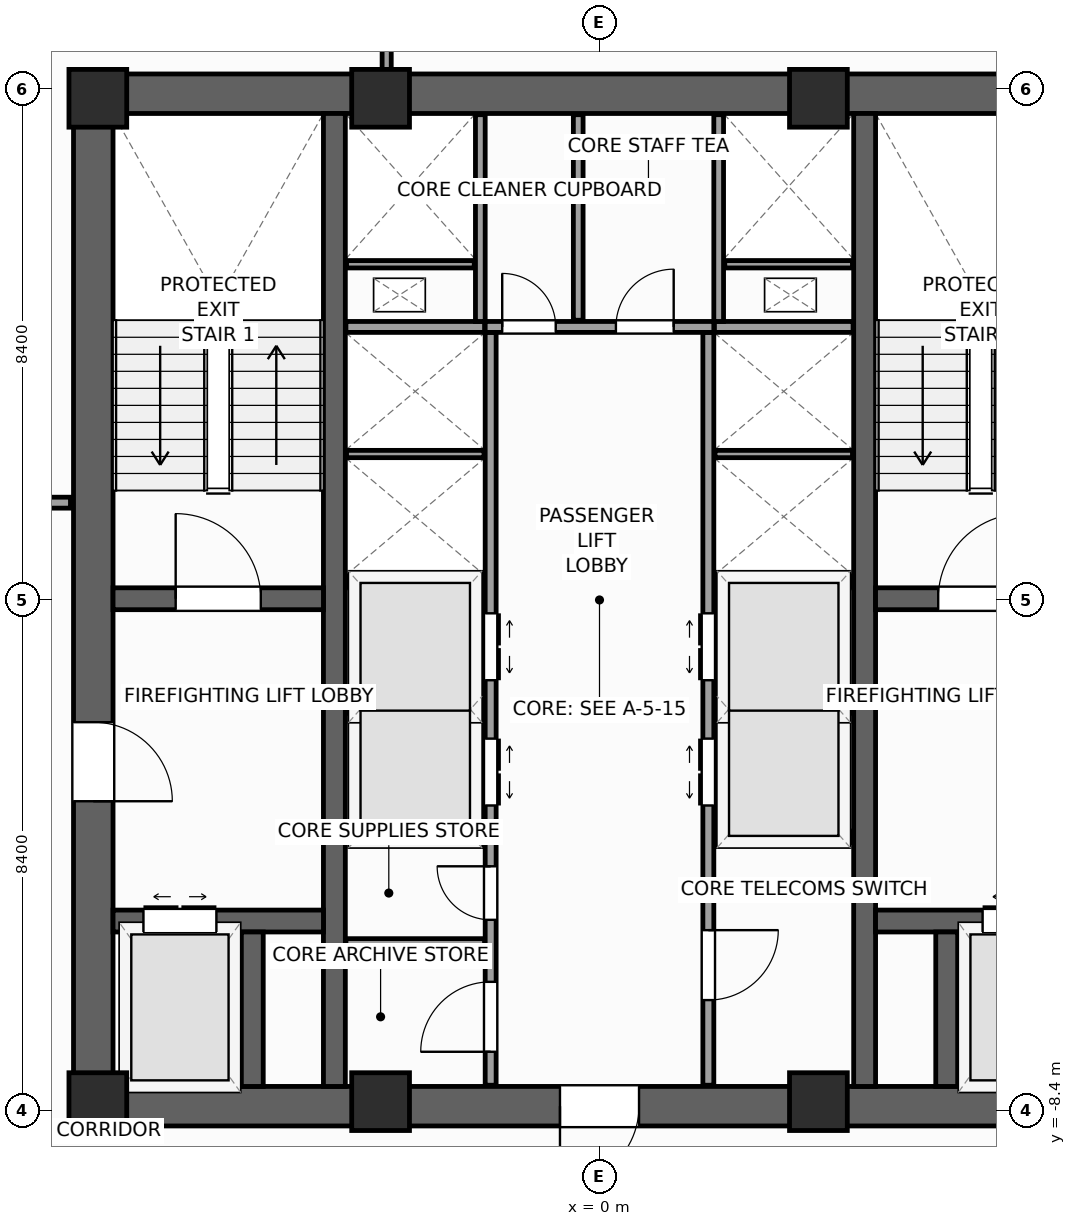
"""IFC4 building model, lengths in metres.
Left out: names, types, materials, properties, quantities, classifications, styles, units other than length and angle.
Written with IfcOpenShell. Run it as: python <this file> out.ifc"""

import sys

from ifc_helpers import new_model, si_unit, direction, frame, frame_2d, origin, origin_2d, place, context, subcontext, project, spatial, rectangle, extrude, source, transform, mapped, element, fill, save


model = new_model("IFC4")
c1 = context("Model", 3, precision=1e-05, world=origin(), true_north=direction((0.0, 1.0)))
c2 = subcontext(c1, "Body", "Model", "MODEL_VIEW")
j1 = project(units=[si_unit("LENGTHUNIT", "METRE"), si_unit("PLANEANGLEUNIT", "RADIAN")], contexts=[c1])
p1 = place(None, origin())
s1 = spatial("IfcSite", under=j1, at=p1, CompositionType="ELEMENT")
p2 = place(p1, origin())
s2 = spatial("IfcBuilding", under=s1, at=p2, CompositionType="ELEMENT")
p3 = place(p2, frame((0.0, 0.0, 156.4)))
s3 = spatial("IfcBuildingStorey", under=s2, at=p3, CompositionType="ELEMENT", Elevation=156.4)
p4 = place(p3, frame((-8.65, -8.325, 0.0), z_axis=(0.0, 0.0, 1.0), x_axis=(1.0, 0.0, 0.0)))
e1 = element("IfcWall", 1, at=p4, inside=s3, PredefinedType="SHEAR", context=c2, shape_type="SweptSolid", body=[
    extrude(rectangle(XDim=17.3, YDim=0.65, at=frame_2d((8.65, 0.0))), origin(), (0.0, 0.0, 1.0), 4.0),
])
p5 = place(p4, frame((8.0, 0.0, 0.0)))
e2 = element("IfcOpeningElement", 2, at=p5, cuts=e1, PredefinedType="OPENING", context=c2, shape_type="SweptSolid", body=[
    extrude(rectangle(XDim=1.3, YDim=2.2, at=frame_2d((0.65, 1.1))), frame((0.0, 0.335, 0.0), z_axis=(0.0, -1.0, 0.0), x_axis=(1.0, 0.0, 0.0)), (0.0, 0.0, 1.0), 0.67),
])
p6 = place(p3, frame((-8.65, 8.325, 0.0), z_axis=(0.0, 0.0, 1.0), x_axis=(1.0, 0.0, 0.0)))
e3 = element("IfcWall", 3, at=p6, inside=s3, PredefinedType="SHEAR", context=c2, shape_type="SweptSolid", body=[
    extrude(rectangle(XDim=17.3, YDim=0.65, at=frame_2d((8.65, 0.0))), origin(), (0.0, 0.0, 1.0), 4.0),
])
p7 = place(p3, frame((-8.325, -8.0, 0.0), z_axis=(0.0, 0.0, 1.0), x_axis=(0.0, 1.0, 0.0)))
e4 = element("IfcWall", 4, at=p7, inside=s3, PredefinedType="SHEAR", context=c2, shape_type="SweptSolid", body=[
    extrude(rectangle(XDim=16.0, YDim=0.65, at=frame_2d((8.0, 0.0))), origin(), (0.0, 0.0, 1.0), 4.0),
])
p8 = place(p7, frame((4.69, 0.0, 0.0)))
e5 = element("IfcOpeningElement", 5, at=p8, cuts=e4, PredefinedType="OPENING", context=c2, shape_type="SweptSolid", body=[
    extrude(rectangle(XDim=1.3, YDim=2.2, at=frame_2d((0.65, 1.1))), frame((0.0, 0.335, 0.0), z_axis=(0.0, -1.0, 0.0), x_axis=(1.0, 0.0, 0.0)), (0.0, 0.0, 1.0), 0.67),
])
for number, where, z_axis, x_axis in (
    (6, (-4.36, -8.0, 0.0), (0.0, 0.0, 1.0), (0.0, 1.0, 0.0)),
    (7, (4.36, -8.0, 0.0), (0.0, 0.0, 1.0), (0.0, 1.0, 0.0)),
):
    element("IfcWall", number, at=place(p3, frame(where, z_axis=z_axis, x_axis=x_axis)), inside=s3, PredefinedType="SHEAR", context=c2, shape_type="SweptSolid", body=[
        extrude(rectangle(XDim=16.0, YDim=0.36, at=frame_2d((8.0, 0.0))), origin(), (0.0, 0.0, 1.0), 4.0),
    ])
p9 = place(p3, frame((-8.0, 0.02, 0.0), z_axis=(0.0, 0.0, 1.0), x_axis=(1.0, 0.0, 0.0)))
e8 = element("IfcWall", 8, at=p9, inside=s3, PredefinedType="SHEAR", context=c2, shape_type="SweptSolid", body=[
    extrude(rectangle(XDim=3.46, YDim=0.36, at=frame_2d((1.73, 0.0))), origin(), (0.0, 0.0, 1.0), 4.0),
])
p10 = place(p9, frame((1.03, 0.0, 0.0)))
e9 = element("IfcOpeningElement", 9, at=p10, cuts=e8, PredefinedType="OPENING", context=c2, shape_type="SweptSolid", body=[
    extrude(rectangle(XDim=1.4, YDim=2.2, at=frame_2d((0.7, 1.1))), frame((0.0, 0.19, 0.0), z_axis=(0.0, -1.0, 0.0), x_axis=(1.0, 0.0, 0.0)), (0.0, 0.0, 1.0), 0.38),
])
p11 = place(p3, frame((4.54, 0.02, 0.0), z_axis=(0.0, 0.0, 1.0), x_axis=(1.0, 0.0, 0.0)))
e10 = element("IfcWall", 10, at=p11, inside=s3, PredefinedType="SHEAR", context=c2, shape_type="SweptSolid", body=[
    extrude(rectangle(XDim=3.46, YDim=0.36, at=frame_2d((1.73, 0.0))), origin(), (0.0, 0.0, 1.0), 4.0),
])
p12 = place(p11, frame((1.03, 0.0, 0.0)))
e11 = element("IfcOpeningElement", 11, at=p12, cuts=e10, PredefinedType="OPENING", context=c2, shape_type="SweptSolid", body=[
    extrude(rectangle(XDim=1.4, YDim=2.2, at=frame_2d((0.7, 1.1))), frame((0.0, 0.19, 0.0), z_axis=(0.0, -1.0, 0.0), x_axis=(1.0, 0.0, 0.0)), (0.0, 0.0, 1.0), 0.38),
])
p13 = place(p3, frame((-8.0, -5.28, 0.0), z_axis=(0.0, 0.0, 1.0), x_axis=(1.0, 0.0, 0.0)))
e12 = element("IfcWall", 12, at=p13, inside=s3, PredefinedType="SHEAR", context=c2, shape_type="SweptSolid", body=[
    extrude(rectangle(XDim=3.46, YDim=0.36, at=frame_2d((1.73, 0.0))), origin(), (0.0, 0.0, 1.0), 4.0),
])
p14 = place(p13, frame((0.5, 0.0, 0.0)))
e13 = element("IfcOpeningElement", 13, at=p14, cuts=e12, PredefinedType="OPENING", context=c2, shape_type="SweptSolid", body=[
    extrude(rectangle(XDim=1.2, YDim=2.25, at=frame_2d((0.6, 1.125))), frame((0.0, 0.19, 0.0), z_axis=(0.0, -1.0, 0.0), x_axis=(1.0, 0.0, 0.0)), (0.0, 0.0, 1.0), 0.38),
])
p15 = place(p3, frame((4.54, -5.28, 0.0), z_axis=(0.0, 0.0, 1.0), x_axis=(1.0, 0.0, 0.0)))
e14 = element("IfcWall", 14, at=p15, inside=s3, PredefinedType="SHEAR", context=c2, shape_type="SweptSolid", body=[
    extrude(rectangle(XDim=3.46, YDim=0.36, at=frame_2d((1.73, 0.0))), origin(), (0.0, 0.0, 1.0), 4.0),
])
p16 = place(p15, frame((1.76, 0.0, 0.0)))
e15 = element("IfcOpeningElement", 15, at=p16, cuts=e14, PredefinedType="OPENING", context=c2, shape_type="SweptSolid", body=[
    extrude(rectangle(XDim=1.2, YDim=2.25, at=frame_2d((0.6, 1.125))), frame((0.0, 0.19, 0.0), z_axis=(0.0, -1.0, 0.0), x_axis=(1.0, 0.0, 0.0)), (0.0, 0.0, 1.0), 0.38),
])
for number, where, z_axis, x_axis in (
    (16, (-5.71, -8.0, 0.0), (0.0, 0.0, 1.0), (0.0, 1.0, 0.0)),
    (17, (5.71, -8.0, 0.0), (0.0, 0.0, 1.0), (0.0, 1.0, 0.0)),
):
    element("IfcWall", number, at=place(p3, frame(where, z_axis=z_axis, x_axis=x_axis)), inside=s3, PredefinedType="SHEAR", context=c2, shape_type="SweptSolid", body=[
        extrude(rectangle(XDim=2.54, YDim=0.36, at=frame_2d((1.27, 0.0))), origin(), (0.0, 0.0, 1.0), 4.0),
    ])
m1 = source(origin(), c2, "Body", "SweptSolid", [
    extrude(rectangle(XDim=0.95, YDim=0.95, at=origin_2d()), origin(), (0.0, 0.0, 1.0), 4.0),
])
for number, where, z_axis, x_axis in (
    (18, (-8.25, -8.25, 0.0), (0.0, 0.0, 1.0), (1.0, 0.0, 0.0)),
    (19, (-8.25, 8.25, 0.0), (0.0, 0.0, 1.0), (1.0, 0.0, 0.0)),
    (20, (-3.6, -8.25, 0.0), (0.0, 0.0, 1.0), (1.0, 0.0, 0.0)),
    (21, (3.6, -8.25, 0.0), (0.0, 0.0, 1.0), (1.0, 0.0, 0.0)),
    (22, (-3.6, 8.25, 0.0), (0.0, 0.0, 1.0), (1.0, 0.0, 0.0)),
    (23, (3.6, 8.25, 0.0), (0.0, 0.0, 1.0), (1.0, 0.0, 0.0)),
):
    element("IfcColumn", number, at=place(p3, frame(where, z_axis=z_axis, x_axis=x_axis)), inside=s3, PredefinedType="PILASTER", context=c2, shape_type="MappedRepresentation", body=[
        mapped(m1, transform((0.0, 0.0, 0.0), scale=1.0)),
    ])
p17 = place(p3, frame((-1.79, -7.98, 0.0), z_axis=(0.0, 0.0, 1.0), x_axis=(0.0, 1.0, 0.0)))
e24 = element("IfcWall", 24, at=p17, inside=s3, PredefinedType="PARTITIONING", context=c2, shape_type="SweptSolid", body=[
    extrude(rectangle(XDim=12.38, YDim=0.18, at=frame_2d((6.19, 0.0))), origin(), (0.0, 0.0, 1.0), 3.74),
])
p18 = place(p17, frame((4.6, 0.0, 0.0)))
e25 = element("IfcOpeningElement", 25, at=p18, cuts=e24, PredefinedType="OPENING", context=c2, shape_type="SweptSolid", body=[
    extrude(rectangle(XDim=1.1, YDim=2.2, at=frame_2d((0.55, 1.1))), frame((0.0, 0.1, 0.0), z_axis=(0.0, -1.0, 0.0), x_axis=(1.0, 0.0, 0.0)), (0.0, 0.0, 1.0), 0.2),
])
p19 = place(p17, frame((6.66, 0.0, 0.0)))
e26 = element("IfcOpeningElement", 26, at=p19, cuts=e24, PredefinedType="OPENING", context=c2, shape_type="SweptSolid", body=[
    extrude(rectangle(XDim=1.1, YDim=2.2, at=frame_2d((0.55, 1.1))), frame((0.0, 0.1, 0.0), z_axis=(0.0, -1.0, 0.0), x_axis=(1.0, 0.0, 0.0)), (0.0, 0.0, 1.0), 0.2),
])
p20 = place(p17, frame((0.55, 0.0, 0.0)))
e27 = element("IfcOpeningElement", 27, at=p20, cuts=e24, PredefinedType="OPENING", context=c2, shape_type="SweptSolid", body=[
    extrude(rectangle(XDim=1.15, YDim=2.25, at=frame_2d((0.575, 1.125))), frame((0.0, 0.1, 0.0), z_axis=(0.0, -1.0, 0.0), x_axis=(1.0, 0.0, 0.0)), (0.0, 0.0, 1.0), 0.2),
])
p21 = place(p17, frame((2.72, 0.0, 0.0)))
e28 = element("IfcOpeningElement", 28, at=p21, cuts=e24, PredefinedType="OPENING", context=c2, shape_type="SweptSolid", body=[
    extrude(rectangle(XDim=0.88, YDim=2.1, at=frame_2d((0.44, 1.05))), frame((0.0, 0.1, 0.0), z_axis=(0.0, -1.0, 0.0), x_axis=(1.0, 0.0, 0.0)), (0.0, 0.0, 1.0), 0.2),
])
p22 = place(p3, frame((1.79, -7.98, 0.0), z_axis=(0.0, 0.0, 1.0), x_axis=(0.0, 1.0, 0.0)))
e29 = element("IfcWall", 29, at=p22, inside=s3, PredefinedType="PARTITIONING", context=c2, shape_type="SweptSolid", body=[
    extrude(rectangle(XDim=12.38, YDim=0.18, at=frame_2d((6.19, 0.0))), origin(), (0.0, 0.0, 1.0), 3.74),
])
p23 = place(p22, frame((4.6, 0.0, 0.0)))
e30 = element("IfcOpeningElement", 30, at=p23, cuts=e29, PredefinedType="OPENING", context=c2, shape_type="SweptSolid", body=[
    extrude(rectangle(XDim=1.1, YDim=2.2, at=frame_2d((0.55, 1.1))), frame((0.0, 0.1, 0.0), z_axis=(0.0, -1.0, 0.0), x_axis=(1.0, 0.0, 0.0)), (0.0, 0.0, 1.0), 0.2),
])
p24 = place(p22, frame((6.66, 0.0, 0.0)))
e31 = element("IfcOpeningElement", 31, at=p24, cuts=e29, PredefinedType="OPENING", context=c2, shape_type="SweptSolid", body=[
    extrude(rectangle(XDim=1.1, YDim=2.2, at=frame_2d((0.55, 1.1))), frame((0.0, 0.1, 0.0), z_axis=(0.0, -1.0, 0.0), x_axis=(1.0, 0.0, 0.0)), (0.0, 0.0, 1.0), 0.2),
])
p25 = place(p22, frame((1.4, 0.0, 0.0)))
e32 = element("IfcOpeningElement", 32, at=p25, cuts=e29, PredefinedType="OPENING", context=c2, shape_type="SweptSolid", body=[
    extrude(rectangle(XDim=1.15, YDim=2.25, at=frame_2d((0.575, 1.125))), frame((0.0, 0.1, 0.0), z_axis=(0.0, -1.0, 0.0), x_axis=(1.0, 0.0, 0.0)), (0.0, 0.0, 1.0), 0.2),
])
p26 = place(p3, frame((-1.88, 4.49, 0.0), z_axis=(0.0, 0.0, 1.0), x_axis=(1.0, 0.0, 0.0)))
e33 = element("IfcWall", 33, at=p26, inside=s3, PredefinedType="PARTITIONING", context=c2, shape_type="SweptSolid", body=[
    extrude(rectangle(XDim=3.76, YDim=0.18, at=frame_2d((1.88, 0.0))), origin(), (0.0, 0.0, 1.0), 3.74),
])
p27 = place(p26, frame((0.28, 0.0, 0.0)))
e34 = element("IfcOpeningElement", 34, at=p27, cuts=e33, PredefinedType="OPENING", context=c2, shape_type="SweptSolid", body=[
    extrude(rectangle(XDim=0.88, YDim=2.1, at=frame_2d((0.44, 1.05))), frame((0.0, 0.1, 0.0), z_axis=(0.0, -1.0, 0.0), x_axis=(1.0, 0.0, 0.0)), (0.0, 0.0, 1.0), 0.2),
])
p28 = place(p26, frame((2.15, 0.0, 0.0)))
e35 = element("IfcOpeningElement", 35, at=p28, cuts=e33, PredefinedType="OPENING", context=c2, shape_type="SweptSolid", body=[
    extrude(rectangle(XDim=0.95, YDim=2.1, at=frame_2d((0.475, 1.05))), frame((0.0, 0.1, 0.0), z_axis=(0.0, -1.0, 0.0), x_axis=(1.0, 0.0, 0.0)), (0.0, 0.0, 1.0), 0.2),
])
for number, where, z_axis, x_axis in (
    (36, (-4.17, -3.9, 0.0), (0.0, 0.0, 1.0), (1.0, 0.0, 0.0)),
    (37, (1.89, -3.9, 0.0), (0.0, 0.0, 1.0), (1.0, 0.0, 0.0)),
    (38, (-4.17, 0.3, 0.0), (0.0, 0.0, 1.0), (1.0, 0.0, 0.0)),
    (39, (1.89, 0.3, 0.0), (0.0, 0.0, 1.0), (1.0, 0.0, 0.0)),
    (40, (-4.17, 4.49, 0.0), (0.0, 0.0, 1.0), (1.0, 0.0, 0.0)),
    (41, (1.89, 4.49, 0.0), (0.0, 0.0, 1.0), (1.0, 0.0, 0.0)),
):
    element("IfcWall", number, at=place(p3, frame(where, z_axis=z_axis, x_axis=x_axis)), inside=s3, PredefinedType="PARTITIONING", context=c2, shape_type="SweptSolid", body=[
        extrude(rectangle(XDim=2.28, YDim=0.18, at=frame_2d((1.14, 0.0))), origin(), (0.0, 0.0, 1.0), 3.74),
    ])
for number, where, z_axis, x_axis in (
    (42, (-4.16, -1.8, 0.0), (0.0, 0.0, 1.0), (1.0, 0.0, 0.0)),
    (43, (1.9, -1.8, 0.0), (0.0, 0.0, 1.0), (1.0, 0.0, 0.0)),
    (44, (-4.16, 2.4, 0.0), (0.0, 0.0, 1.0), (1.0, 0.0, 0.0)),
    (45, (1.9, 2.4, 0.0), (0.0, 0.0, 1.0), (1.0, 0.0, 0.0)),
):
    element("IfcWall", number, at=place(p3, frame(where, z_axis=z_axis, x_axis=x_axis)), inside=s3, PredefinedType="PARTITIONING", context=c2, shape_type="SweptSolid", body=[
        extrude(rectangle(XDim=2.26, YDim=0.12, at=frame_2d((1.13, 0.0))), origin(), (0.0, 0.0, 1.0), 3.74),
    ])
p29 = place(p3, frame((-4.17, -5.65, 0.0), z_axis=(0.0, 0.0, 1.0), x_axis=(1.0, 0.0, 0.0)))
e46 = element("IfcWall", 46, at=p29, inside=s3, PredefinedType="PARTITIONING", context=c2, shape_type="SweptSolid", body=[
    extrude(rectangle(XDim=2.28, YDim=0.16, at=frame_2d((1.14, 0.0))), origin(), (0.0, 0.0, 1.0), 3.74),
])
for number, where, z_axis, x_axis in (
    (47, (-1.96, 4.58, 0.0), (0.0, 0.0, 1.0), (0.0, 1.0, 0.0)),
    (48, (1.96, 4.58, 0.0), (0.0, 0.0, 1.0), (0.0, 1.0, 0.0)),
):
    element("IfcWall", number, at=place(p3, frame(where, z_axis=z_axis, x_axis=x_axis)), inside=s3, PredefinedType="PARTITIONING", context=c2, shape_type="SweptSolid", body=[
        extrude(rectangle(XDim=3.4, YDim=0.16, at=frame_2d((1.7, 0.0))), origin(), (0.0, 0.0, 1.0), 3.74),
    ])
for number, where, z_axis, x_axis in (
    (49, (-4.16, 5.52, 0.0), (0.0, 0.0, 1.0), (1.0, 0.0, 0.0)),
    (50, (2.06, 5.52, 0.0), (0.0, 0.0, 1.0), (1.0, 0.0, 0.0)),
):
    element("IfcWall", number, at=place(p3, frame(where, z_axis=z_axis, x_axis=x_axis)), inside=s3, PredefinedType="PARTITIONING", context=c2, shape_type="SweptSolid", body=[
        extrude(rectangle(XDim=2.1, YDim=0.12, at=frame_2d((1.05, 0.0))), origin(), (0.0, 0.0, 1.0), 3.74),
    ])
p30 = place(p3, frame((-0.35, 4.6, 0.0), z_axis=(0.0, 0.0, 1.0), x_axis=(0.0, 1.0, 0.0)))
e51 = element("IfcWall", 51, at=p30, inside=s3, PredefinedType="PARTITIONING", context=c2, shape_type="SweptSolid", body=[
    extrude(rectangle(XDim=3.38, YDim=0.16, at=frame_2d((1.69, 0.0))), origin(), (0.0, 0.0, 1.0), 3.74),
])
p31 = place(p3, frame((-11.55, 1.6, 0.0), z_axis=(0.0, 0.0, 1.0), x_axis=(1.0, 0.0, 0.0)))
e52 = element("IfcWall", 52, at=p31, inside=s3, PredefinedType="PARTITIONING", context=c2, shape_type="SweptSolid", body=[
    extrude(rectangle(XDim=2.85, YDim=0.18, at=frame_2d((1.425, 0.0))), origin(), (0.0, 0.0, 1.0), 3.74),
])
p32 = place(p31, frame((0.875, 0.0, 0.0)))
e53 = element("IfcOpeningElement", 53, at=p32, cuts=e52, PredefinedType="OPENING", context=c2, shape_type="SweptSolid", body=[
    extrude(rectangle(XDim=1.1, YDim=2.2, at=frame_2d((0.55, 1.1))), frame((0.0, 0.1, 0.0), z_axis=(0.0, -1.0, 0.0), x_axis=(1.0, 0.0, 0.0)), (0.0, 0.0, 1.0), 0.2),
])
p33 = place(p3, frame((-3.5, 8.655, 0.0), z_axis=(0.0, 0.0, 1.0), x_axis=(0.0, 1.0, 0.0)))
e54 = element("IfcWall", 54, at=p33, inside=s3, PredefinedType="PARTITIONING", context=c2, shape_type="SweptSolid", body=[
    extrude(rectangle(XDim=19.411, YDim=0.15, at=frame_2d((9.706, 0.0))), origin(), (0.0, 0.0, 1.0), 3.74),
])
m2 = source(origin(), c2, "Body", "SweptSolid", [
    extrude(rectangle(XDim=1.4, YDim=2.2, at=frame_2d((0.7, 1.1))), frame((0.0, 0.025, 0.0), z_axis=(0.0, -1.0, 0.0), x_axis=(1.0, 0.0, 0.0)), (0.0, 0.0, 1.0), 0.05),
])
p34 = place(p10, origin())
e55 = element("IfcDoor", 55, at=p34, inside=s3, OperationType="SINGLE_SWING_LEFT", PredefinedType="DOOR", context=c2, shape_type="MappedRepresentation", body=[
    mapped(m2, transform((0.0, 0.0, 0.0), scale=1.0)),
])
fill(e9, e55)
p35 = place(p12, origin())
e56 = element("IfcDoor", 56, at=p35, inside=s3, OperationType="SINGLE_SWING_RIGHT", PredefinedType="DOOR", context=c2, shape_type="MappedRepresentation", body=[
    mapped(m2, transform((0.0, 0.0, 0.0), scale=1.0)),
])
fill(e11, e56)
m3 = source(origin(), c2, "Body", "SweptSolid", [
    extrude(rectangle(XDim=1.3, YDim=2.2, at=frame_2d((0.65, 1.1))), frame((0.0, 0.025, 0.0), z_axis=(0.0, -1.0, 0.0), x_axis=(1.0, 0.0, 0.0)), (0.0, 0.0, 1.0), 0.05),
])
p36 = place(p8, frame((1.3, 0.0, 0.0), z_axis=(0.0, 0.0, 1.0), x_axis=(-1.0, 0.0, 0.0)))
e57 = element("IfcDoor", 57, at=p36, inside=s3, OperationType="SINGLE_SWING_LEFT", PredefinedType="DOOR", context=c2, shape_type="MappedRepresentation", body=[
    mapped(m3, transform((0.0, 0.0, 0.0), scale=1.0)),
])
fill(e5, e57)
p37 = place(p5, frame((1.3, 0.0, 0.0), z_axis=(0.0, 0.0, 1.0), x_axis=(-1.0, 0.0, 0.0)))
e58 = element("IfcDoor", 58, at=p37, inside=s3, OperationType="SINGLE_SWING_LEFT", PredefinedType="DOOR", context=c2, shape_type="MappedRepresentation", body=[
    mapped(m3, transform((0.0, 0.0, 0.0), scale=1.0)),
])
fill(e2, e58)
m4 = source(origin(), c2, "Body", "SweptSolid", [
    extrude(rectangle(XDim=1.2, YDim=2.25, at=frame_2d((0.6, 1.125))), frame((0.0, 0.025, 0.0), z_axis=(0.0, -1.0, 0.0), x_axis=(1.0, 0.0, 0.0)), (0.0, 0.0, 1.0), 0.05),
])
p38 = place(p14, origin())
e59 = element("IfcDoor", 59, at=p38, inside=s3, OperationType="DOUBLE_DOOR_SLIDING", PredefinedType="DOOR", context=c2, shape_type="MappedRepresentation", body=[
    mapped(m4, transform((0.0, 0.0, 0.0), scale=1.0)),
])
fill(e13, e59)
p39 = place(p16, origin())
e60 = element("IfcDoor", 60, at=p39, inside=s3, OperationType="DOUBLE_DOOR_SLIDING", PredefinedType="DOOR", context=c2, shape_type="MappedRepresentation", body=[
    mapped(m4, transform((0.0, 0.0, 0.0), scale=1.0)),
])
fill(e15, e60)
m5 = source(origin(), c2, "Body", "SweptSolid", [
    extrude(rectangle(XDim=1.1, YDim=2.2, at=frame_2d((0.55, 1.1))), frame((0.0, 0.025, 0.0), z_axis=(0.0, -1.0, 0.0), x_axis=(1.0, 0.0, 0.0)), (0.0, 0.0, 1.0), 0.05),
])
p40 = place(p18, frame((1.1, 0.0, 0.0), z_axis=(0.0, 0.0, 1.0), x_axis=(-1.0, 0.0, 0.0)))
e61 = element("IfcDoor", 61, at=p40, inside=s3, OperationType="DOUBLE_DOOR_SLIDING", PredefinedType="DOOR", context=c2, shape_type="MappedRepresentation", body=[
    mapped(m5, transform((0.0, 0.0, 0.0), scale=1.0)),
])
fill(e25, e61)
p41 = place(p19, frame((1.1, 0.0, 0.0), z_axis=(0.0, 0.0, 1.0), x_axis=(-1.0, 0.0, 0.0)))
e62 = element("IfcDoor", 62, at=p41, inside=s3, OperationType="DOUBLE_DOOR_SLIDING", PredefinedType="DOOR", context=c2, shape_type="MappedRepresentation", body=[
    mapped(m5, transform((0.0, 0.0, 0.0), scale=1.0)),
])
fill(e26, e62)
p42 = place(p23, origin())
e63 = element("IfcDoor", 63, at=p42, inside=s3, OperationType="DOUBLE_DOOR_SLIDING", PredefinedType="DOOR", context=c2, shape_type="MappedRepresentation", body=[
    mapped(m5, transform((0.0, 0.0, 0.0), scale=1.0)),
])
fill(e30, e63)
p43 = place(p24, origin())
e64 = element("IfcDoor", 64, at=p43, inside=s3, OperationType="DOUBLE_DOOR_SLIDING", PredefinedType="DOOR", context=c2, shape_type="MappedRepresentation", body=[
    mapped(m5, transform((0.0, 0.0, 0.0), scale=1.0)),
])
fill(e31, e64)
m6 = source(origin(), c2, "Body", "SweptSolid", [
    extrude(rectangle(XDim=1.15, YDim=2.25, at=frame_2d((0.575, 1.125))), frame((0.0, 0.025, 0.0), z_axis=(0.0, -1.0, 0.0), x_axis=(1.0, 0.0, 0.0)), (0.0, 0.0, 1.0), 0.05),
])
p44 = place(p20, origin())
e65 = element("IfcDoor", 65, at=p44, inside=s3, OperationType="SINGLE_SWING_LEFT", PredefinedType="DOOR", context=c2, shape_type="MappedRepresentation", body=[
    mapped(m6, transform((0.0, 0.0, 0.0), scale=1.0)),
])
fill(e27, e65)
m7 = source(origin(), c2, "Body", "SweptSolid", [
    extrude(rectangle(XDim=0.88, YDim=2.1, at=frame_2d((0.44, 1.05))), frame((0.0, 0.025, 0.0), z_axis=(0.0, -1.0, 0.0), x_axis=(1.0, 0.0, 0.0)), (0.0, 0.0, 1.0), 0.05),
])
p45 = place(p21, origin())
e66 = element("IfcDoor", 66, at=p45, inside=s3, OperationType="SINGLE_SWING_RIGHT", PredefinedType="DOOR", context=c2, shape_type="MappedRepresentation", body=[
    mapped(m7, transform((0.0, 0.0, 0.0), scale=1.0)),
])
fill(e28, e66)
p46 = place(p25, frame((1.15, 0.0, 0.0), z_axis=(0.0, 0.0, 1.0), x_axis=(-1.0, 0.0, 0.0)))
e67 = element("IfcDoor", 67, at=p46, inside=s3, OperationType="SINGLE_SWING_RIGHT", PredefinedType="DOOR", context=c2, shape_type="MappedRepresentation", body=[
    mapped(m6, transform((0.0, 0.0, 0.0), scale=1.0)),
])
fill(e32, e67)
p47 = place(p27, origin())
e68 = element("IfcDoor", 68, at=p47, inside=s3, OperationType="SINGLE_SWING_LEFT", PredefinedType="DOOR", context=c2, shape_type="MappedRepresentation", body=[
    mapped(m7, transform((0.0, 0.0, 0.0), scale=1.0)),
])
fill(e34, e68)
m8 = source(origin(), c2, "Body", "SweptSolid", [
    extrude(rectangle(XDim=0.95, YDim=2.1, at=frame_2d((0.475, 1.05))), frame((0.0, 0.025, 0.0), z_axis=(0.0, -1.0, 0.0), x_axis=(1.0, 0.0, 0.0)), (0.0, 0.0, 1.0), 0.05),
])
p48 = place(p28, origin())
e69 = element("IfcDoor", 69, at=p48, inside=s3, OperationType="SINGLE_SWING_RIGHT", PredefinedType="DOOR", context=c2, shape_type="MappedRepresentation", body=[
    mapped(m8, transform((0.0, 0.0, 0.0), scale=1.0)),
])
fill(e35, e69)
save(model, sys.argv[1])
